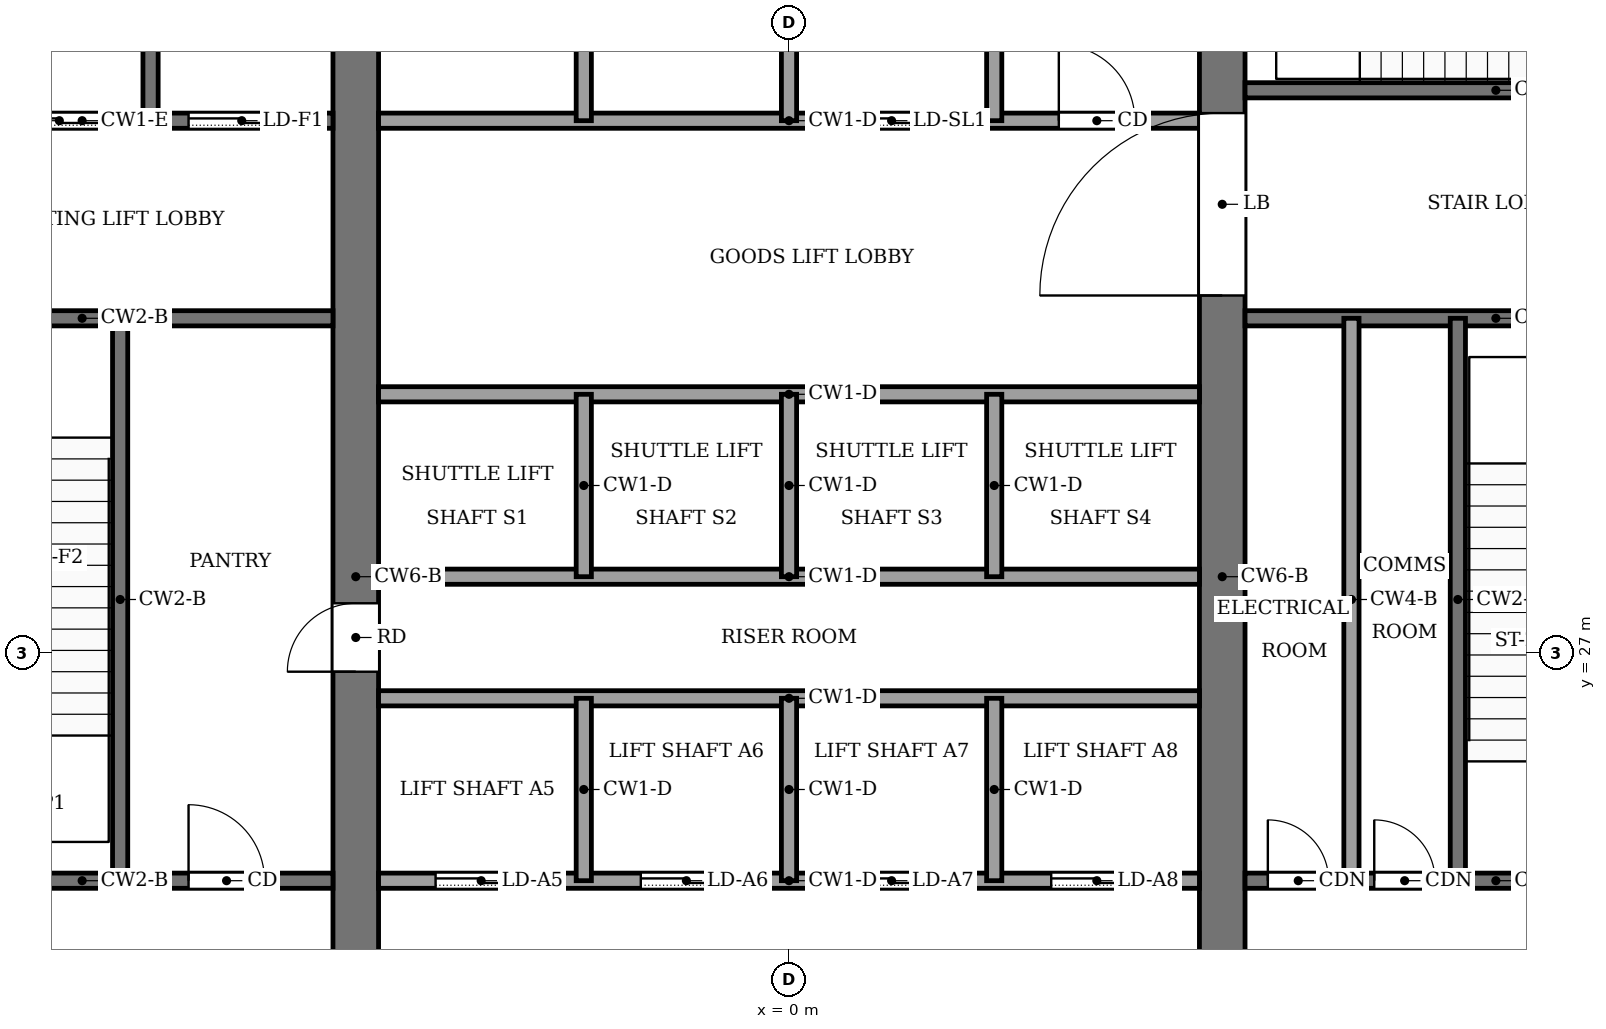
"""IFC4 building model, lengths in metres.
Left out: names, types, materials, properties, quantities, classifications, styles, units other than length and angle.
Written with IfcOpenShell. Run it as: python <this file> out.ifc"""

import sys

from ifc_helpers import new_model, si_unit, direction, frame, frame_2d, origin, place, context, subcontext, project, spatial, rectangle, extrude, element, fill, save


model = new_model("IFC4")
c1 = context("Model", 3, precision=1e-05, world=origin(), true_north=direction((0.0, 1.0)))
c2 = subcontext(c1, "Body", "Model", "MODEL_VIEW")
j1 = project(units=[si_unit("LENGTHUNIT", "METRE"), si_unit("PLANEANGLEUNIT", "RADIAN")], contexts=[c1])
p1 = place(None, origin())
s1 = spatial("IfcSite", under=j1, at=p1, CompositionType="ELEMENT")
p2 = place(p1, origin())
s2 = spatial("IfcBuilding", under=s1, at=p2, CompositionType="ELEMENT")
p3 = place(p2, frame((0.0, 0.0, 65.0)))
s3 = spatial("IfcBuildingStorey", under=s2, at=p3, CompositionType="ELEMENT", Elevation=65.0)
p4 = place(p3, frame((-5.7, 18.4, -0.13), z_axis=(0.0, 0.0, 1.0), x_axis=(0.0, 1.0, 0.0)))
e1 = element("IfcWall", 1, at=p4, inside=s3, PredefinedType="SHEAR", context=c2, shape_type="SweptSolid", body=[
    extrude(rectangle(XDim=19.2, YDim=0.6, at=frame_2d((9.6, 0.0))), origin(), (0.0, 0.0, 1.0), 5.0),
])
p5 = place(p4, frame((8.35, 0.0, 0.13)))
e2 = element("IfcOpeningElement", 2, at=p5, cuts=e1, PredefinedType="OPENING", context=c2, shape_type="SweptSolid", body=[
    extrude(rectangle(XDim=0.9, YDim=2.1, at=frame_2d((0.45, 1.05))), frame((0.0, 0.31, 0.0), z_axis=(0.0, -1.0, 0.0), x_axis=(1.0, 0.0, 0.0)), (0.0, 0.0, 1.0), 0.62),
])
p6 = place(p3, frame((5.7, 18.4, -0.13), z_axis=(0.0, 0.0, 1.0), x_axis=(0.0, 1.0, 0.0)))
e3 = element("IfcWall", 3, at=p6, inside=s3, PredefinedType="SHEAR", context=c2, shape_type="SweptSolid", body=[
    extrude(rectangle(XDim=19.2, YDim=0.6, at=frame_2d((9.6, 0.0))), origin(), (0.0, 0.0, 1.0), 5.0),
])
p7 = place(p6, frame((13.3, 0.0, 0.13)))
e4 = element("IfcOpeningElement", 4, at=p7, cuts=e3, PredefinedType="OPENING", context=c2, shape_type="SweptSolid", body=[
    extrude(rectangle(XDim=2.4, YDim=2.4, at=frame_2d((1.2, 1.2))), frame((0.0, 0.31, 0.0), z_axis=(0.0, -1.0, 0.0), x_axis=(1.0, 0.0, 0.0)), (0.0, 0.0, 1.0), 0.62),
])
p8 = place(p3, frame((-12.6, 24.0, 0.0), z_axis=(0.0, 0.0, 1.0), x_axis=(1.0, 0.0, 0.0)))
e5 = element("IfcWall", 5, at=p8, inside=s3, PredefinedType="PARTITIONING", context=c2, shape_type="SweptSolid", body=[
    extrude(rectangle(XDim=6.6, YDim=0.2, at=frame_2d((3.3, 0.0))), origin(), (0.0, 0.0, 1.0), 4.87),
])
p9 = place(p8, frame((4.7, 0.0, 0.0)))
e6 = element("IfcOpeningElement", 6, at=p9, cuts=e5, PredefinedType="OPENING", context=c2, shape_type="SweptSolid", body=[
    extrude(rectangle(XDim=1.0, YDim=2.1, at=frame_2d((0.5, 1.05))), frame((0.0, 0.11, 0.0), z_axis=(0.0, -1.0, 0.0), x_axis=(1.0, 0.0, 0.0)), (0.0, 0.0, 1.0), 0.22),
])
p10 = place(p3, frame((-5.4, 24.0, 0.0), z_axis=(0.0, 0.0, 1.0), x_axis=(1.0, 0.0, 0.0)))
e7 = element("IfcWall", 7, at=p10, inside=s3, PredefinedType="PARTITIONING", context=c2, shape_type="SweptSolid", body=[
    extrude(rectangle(XDim=10.8, YDim=0.2, at=frame_2d((5.4, 0.0))), origin(), (0.0, 0.0, 1.0), 4.87),
])
p11 = place(p10, frame((0.75, 0.0, 0.0)))
e8 = element("IfcOpeningElement", 8, at=p11, cuts=e7, PredefinedType="OPENING", context=c2, shape_type="SweptSolid", body=[
    extrude(rectangle(XDim=1.2, YDim=2.2, at=frame_2d((0.6, 1.1))), frame((0.0, 0.11, 0.0), z_axis=(0.0, -1.0, 0.0), x_axis=(1.0, 0.0, 0.0)), (0.0, 0.0, 1.0), 0.22),
])
p12 = place(p10, frame((3.45, 0.0, 0.0)))
e9 = element("IfcOpeningElement", 9, at=p12, cuts=e7, PredefinedType="OPENING", context=c2, shape_type="SweptSolid", body=[
    extrude(rectangle(XDim=1.2, YDim=2.2, at=frame_2d((0.6, 1.1))), frame((0.0, 0.11, 0.0), z_axis=(0.0, -1.0, 0.0), x_axis=(1.0, 0.0, 0.0)), (0.0, 0.0, 1.0), 0.22),
])
p13 = place(p10, frame((6.15, 0.0, 0.0)))
e10 = element("IfcOpeningElement", 10, at=p13, cuts=e7, PredefinedType="OPENING", context=c2, shape_type="SweptSolid", body=[
    extrude(rectangle(XDim=1.2, YDim=2.2, at=frame_2d((0.6, 1.1))), frame((0.0, 0.11, 0.0), z_axis=(0.0, -1.0, 0.0), x_axis=(1.0, 0.0, 0.0)), (0.0, 0.0, 1.0), 0.22),
])
p14 = place(p10, frame((8.85, 0.0, 0.0)))
e11 = element("IfcOpeningElement", 11, at=p14, cuts=e7, PredefinedType="OPENING", context=c2, shape_type="SweptSolid", body=[
    extrude(rectangle(XDim=1.2, YDim=2.2, at=frame_2d((0.6, 1.1))), frame((0.0, 0.11, 0.0), z_axis=(0.0, -1.0, 0.0), x_axis=(1.0, 0.0, 0.0)), (0.0, 0.0, 1.0), 0.22),
])
p15 = place(p3, frame((6.0, 24.0, 0.0), z_axis=(0.0, 0.0, 1.0), x_axis=(1.0, 0.0, 0.0)))
e12 = element("IfcWall", 12, at=p15, inside=s3, PredefinedType="PARTITIONING", context=c2, shape_type="SweptSolid", body=[
    extrude(rectangle(XDim=6.6, YDim=0.2, at=frame_2d((3.3, 0.0))), origin(), (0.0, 0.0, 1.0), 4.87),
])
p16 = place(p15, frame((0.3, 0.0, 0.0)))
e13 = element("IfcOpeningElement", 13, at=p16, cuts=e12, PredefinedType="OPENING", context=c2, shape_type="SweptSolid", body=[
    extrude(rectangle(XDim=0.8, YDim=2.1, at=frame_2d((0.4, 1.05))), frame((0.0, 0.11, 0.0), z_axis=(0.0, -1.0, 0.0), x_axis=(1.0, 0.0, 0.0)), (0.0, 0.0, 1.0), 0.22),
])
p17 = place(p15, frame((1.7, 0.0, 0.0)))
e14 = element("IfcOpeningElement", 14, at=p17, cuts=e12, PredefinedType="OPENING", context=c2, shape_type="SweptSolid", body=[
    extrude(rectangle(XDim=0.8, YDim=2.1, at=frame_2d((0.4, 1.05))), frame((0.0, 0.11, 0.0), z_axis=(0.0, -1.0, 0.0), x_axis=(1.0, 0.0, 0.0)), (0.0, 0.0, 1.0), 0.22),
])
p18 = place(p15, frame((4.4, 0.0, 0.0)))
e15 = element("IfcOpeningElement", 15, at=p18, cuts=e12, PredefinedType="OPENING", context=c2, shape_type="SweptSolid", body=[
    extrude(rectangle(XDim=1.2, YDim=2.2, at=frame_2d((0.6, 1.1))), frame((0.0, 0.11, 0.0), z_axis=(0.0, -1.0, 0.0), x_axis=(1.0, 0.0, 0.0)), (0.0, 0.0, 1.0), 0.22),
])
for number, where, z_axis, x_axis in (
    (16, (-5.4, 26.4, 0.0), (0.0, 0.0, 1.0), (1.0, 0.0, 0.0)),
    (17, (-5.4, 28.0, 0.0), (0.0, 0.0, 1.0), (1.0, 0.0, 0.0)),
    (18, (-5.4, 30.4, 0.0), (0.0, 0.0, 1.0), (1.0, 0.0, 0.0)),
):
    element("IfcWall", number, at=place(p3, frame(where, z_axis=z_axis, x_axis=x_axis)), inside=s3, PredefinedType="PARTITIONING", context=c2, shape_type="SweptSolid", body=[
        extrude(rectangle(XDim=10.8, YDim=0.2, at=frame_2d((5.4, 0.0))), origin(), (0.0, 0.0, 1.0), 4.87),
    ])
p19 = place(p3, frame((-12.6, 31.4, 0.0), z_axis=(0.0, 0.0, 1.0), x_axis=(1.0, 0.0, 0.0)))
e19 = element("IfcWall", 19, at=p19, inside=s3, PredefinedType="PARTITIONING", context=c2, shape_type="SweptSolid", body=[
    extrude(rectangle(XDim=6.6, YDim=0.2, at=frame_2d((3.3, 0.0))), origin(), (0.0, 0.0, 1.0), 4.87),
])
p20 = place(p19, frame((1.0, 0.0, 0.0)))
e20 = element("IfcOpeningElement", 20, at=p20, cuts=e19, PredefinedType="OPENING", context=c2, shape_type="SweptSolid", body=[
    extrude(rectangle(XDim=1.2, YDim=2.2, at=frame_2d((0.6, 1.1))), frame((0.0, 0.11, 0.0), z_axis=(0.0, -1.0, 0.0), x_axis=(1.0, 0.0, 0.0)), (0.0, 0.0, 1.0), 0.22),
])
p21 = place(p3, frame((6.0, 31.4, 0.0), z_axis=(0.0, 0.0, 1.0), x_axis=(1.0, 0.0, 0.0)))
e21 = element("IfcWall", 21, at=p21, inside=s3, PredefinedType="PARTITIONING", context=c2, shape_type="SweptSolid", body=[
    extrude(rectangle(XDim=6.6, YDim=0.2, at=frame_2d((3.3, 0.0))), origin(), (0.0, 0.0, 1.0), 4.87),
])
p22 = place(p3, frame((-12.6, 34.0, 0.0), z_axis=(0.0, 0.0, 1.0), x_axis=(1.0, 0.0, 0.0)))
e22 = element("IfcWall", 22, at=p22, inside=s3, PredefinedType="PARTITIONING", context=c2, shape_type="SweptSolid", body=[
    extrude(rectangle(XDim=6.6, YDim=0.2, at=frame_2d((3.3, 0.0))), origin(), (0.0, 0.0, 1.0), 4.87),
])
p23 = place(p22, frame((4.7, 0.0, 0.0)))
e23 = element("IfcOpeningElement", 23, at=p23, cuts=e22, PredefinedType="OPENING", context=c2, shape_type="SweptSolid", body=[
    extrude(rectangle(XDim=1.4, YDim=2.2, at=frame_2d((0.7, 1.1))), frame((0.0, 0.11, 0.0), z_axis=(0.0, -1.0, 0.0), x_axis=(1.0, 0.0, 0.0)), (0.0, 0.0, 1.0), 0.22),
])
p24 = place(p22, frame((2.3, 0.0, 0.0)))
e24 = element("IfcOpeningElement", 24, at=p24, cuts=e22, PredefinedType="OPENING", context=c2, shape_type="SweptSolid", body=[
    extrude(rectangle(XDim=1.4, YDim=2.2, at=frame_2d((0.7, 1.1))), frame((0.0, 0.11, 0.0), z_axis=(0.0, -1.0, 0.0), x_axis=(1.0, 0.0, 0.0)), (0.0, 0.0, 1.0), 0.22),
])
p25 = place(p22, frame((0.45, 0.0, 0.0)))
e25 = element("IfcOpeningElement", 25, at=p25, cuts=e22, PredefinedType="OPENING", context=c2, shape_type="SweptSolid", body=[
    extrude(rectangle(XDim=0.9, YDim=2.1, at=frame_2d((0.45, 1.05))), frame((0.0, 0.11, 0.0), z_axis=(0.0, -1.0, 0.0), x_axis=(1.0, 0.0, 0.0)), (0.0, 0.0, 1.0), 0.22),
])
p26 = place(p3, frame((-5.4, 34.0, 0.0), z_axis=(0.0, 0.0, 1.0), x_axis=(1.0, 0.0, 0.0)))
e26 = element("IfcWall", 26, at=p26, inside=s3, PredefinedType="PARTITIONING", context=c2, shape_type="SweptSolid", body=[
    extrude(rectangle(XDim=10.8, YDim=0.2, at=frame_2d((5.4, 0.0))), origin(), (0.0, 0.0, 1.0), 4.87),
])
p27 = place(p26, frame((6.15, 0.0, 0.0)))
e27 = element("IfcOpeningElement", 27, at=p27, cuts=e26, PredefinedType="OPENING", context=c2, shape_type="SweptSolid", body=[
    extrude(rectangle(XDim=1.2, YDim=2.2, at=frame_2d((0.6, 1.1))), frame((0.0, 0.11, 0.0), z_axis=(0.0, -1.0, 0.0), x_axis=(1.0, 0.0, 0.0)), (0.0, 0.0, 1.0), 0.22),
])
p28 = place(p26, frame((8.95, 0.0, 0.0)))
e28 = element("IfcOpeningElement", 28, at=p28, cuts=e26, PredefinedType="OPENING", context=c2, shape_type="SweptSolid", body=[
    extrude(rectangle(XDim=1.0, YDim=2.1, at=frame_2d((0.5, 1.05))), frame((0.0, 0.11, 0.0), z_axis=(0.0, -1.0, 0.0), x_axis=(1.0, 0.0, 0.0)), (0.0, 0.0, 1.0), 0.22),
])
p29 = place(p3, frame((6.0, 34.4, 0.0), z_axis=(0.0, 0.0, 1.0), x_axis=(1.0, 0.0, 0.0)))
e29 = element("IfcWall", 29, at=p29, inside=s3, PredefinedType="PARTITIONING", context=c2, shape_type="SweptSolid", body=[
    extrude(rectangle(XDim=6.6, YDim=0.2, at=frame_2d((3.3, 0.0))), origin(), (0.0, 0.0, 1.0), 4.87),
])
p30 = place(p29, frame((4.8, 0.0, 0.0)))
e30 = element("IfcOpeningElement", 30, at=p30, cuts=e29, PredefinedType="OPENING", context=c2, shape_type="SweptSolid", body=[
    extrude(rectangle(XDim=1.2, YDim=2.2, at=frame_2d((0.6, 1.1))), frame((0.0, 0.11, 0.0), z_axis=(0.0, -1.0, 0.0), x_axis=(1.0, 0.0, 0.0)), (0.0, 0.0, 1.0), 0.22),
])
p31 = place(p3, frame((-8.8, 24.0, 0.0), z_axis=(0.0, 0.0, 1.0), x_axis=(0.0, 1.0, 0.0)))
e31 = element("IfcWall", 31, at=p31, inside=s3, PredefinedType="PARTITIONING", context=c2, shape_type="SweptSolid", body=[
    extrude(rectangle(XDim=7.4, YDim=0.2, at=frame_2d((3.7, 0.0))), origin(), (0.0, 0.0, 1.0), 4.87),
])
p32 = place(p3, frame((-8.4, 34.0, 0.0), z_axis=(0.0, 0.0, 1.0), x_axis=(0.0, 1.0, 0.0)))
e32 = element("IfcWall", 32, at=p32, inside=s3, PredefinedType="PARTITIONING", context=c2, shape_type="SweptSolid", body=[
    extrude(rectangle(XDim=3.6, YDim=0.2, at=frame_2d((1.8, 0.0))), origin(), (0.0, 0.0, 1.0), 4.87),
])
for number, where, z_axis, x_axis in (
    (33, (-2.7, 24.0, 0.0), (0.0, 0.0, 1.0), (0.0, 1.0, 0.0)),
    (34, (-2.7, 28.0, 0.0), (0.0, 0.0, 1.0), (0.0, 1.0, 0.0)),
):
    element("IfcWall", number, at=place(p3, frame(where, z_axis=z_axis, x_axis=x_axis)), inside=s3, PredefinedType="PARTITIONING", context=c2, shape_type="SweptSolid", body=[
        extrude(rectangle(XDim=2.4, YDim=0.2, at=frame_2d((1.2, 0.0))), origin(), (0.0, 0.0, 1.0), 4.87),
    ])
p33 = place(p3, frame((-2.7, 34.0, 0.0), z_axis=(0.0, 0.0, 1.0), x_axis=(0.0, 1.0, 0.0)))
e35 = element("IfcWall", 35, at=p33, inside=s3, PredefinedType="PARTITIONING", context=c2, shape_type="SweptSolid", body=[
    extrude(rectangle(XDim=3.6, YDim=0.2, at=frame_2d((1.8, 0.0))), origin(), (0.0, 0.0, 1.0), 4.87),
])
for number, where, z_axis, x_axis in (
    (36, (0.0, 24.0, 0.0), (0.0, 0.0, 1.0), (0.0, 1.0, 0.0)),
    (37, (0.0, 28.0, 0.0), (0.0, 0.0, 1.0), (0.0, 1.0, 0.0)),
):
    element("IfcWall", number, at=place(p3, frame(where, z_axis=z_axis, x_axis=x_axis)), inside=s3, PredefinedType="PARTITIONING", context=c2, shape_type="SweptSolid", body=[
        extrude(rectangle(XDim=2.4, YDim=0.2, at=frame_2d((1.2, 0.0))), origin(), (0.0, 0.0, 1.0), 4.87),
    ])
p34 = place(p3, frame((0.0, 34.0, 0.0), z_axis=(0.0, 0.0, 1.0), x_axis=(0.0, 1.0, 0.0)))
e38 = element("IfcWall", 38, at=p34, inside=s3, PredefinedType="PARTITIONING", context=c2, shape_type="SweptSolid", body=[
    extrude(rectangle(XDim=3.6, YDim=0.2, at=frame_2d((1.8, 0.0))), origin(), (0.0, 0.0, 1.0), 4.87),
])
for number, where, z_axis, x_axis in (
    (39, (2.7, 24.0, 0.0), (0.0, 0.0, 1.0), (0.0, 1.0, 0.0)),
    (40, (2.7, 28.0, 0.0), (0.0, 0.0, 1.0), (0.0, 1.0, 0.0)),
):
    element("IfcWall", number, at=place(p3, frame(where, z_axis=z_axis, x_axis=x_axis)), inside=s3, PredefinedType="PARTITIONING", context=c2, shape_type="SweptSolid", body=[
        extrude(rectangle(XDim=2.4, YDim=0.2, at=frame_2d((1.2, 0.0))), origin(), (0.0, 0.0, 1.0), 4.87),
    ])
p35 = place(p3, frame((2.7, 34.0, 0.0), z_axis=(0.0, 0.0, 1.0), x_axis=(0.0, 1.0, 0.0)))
e41 = element("IfcWall", 41, at=p35, inside=s3, PredefinedType="PARTITIONING", context=c2, shape_type="SweptSolid", body=[
    extrude(rectangle(XDim=3.6, YDim=0.2, at=frame_2d((1.8, 0.0))), origin(), (0.0, 0.0, 1.0), 4.87),
])
for number, where, z_axis, x_axis in (
    (42, (7.4, 24.0, 0.0), (0.0, 0.0, 1.0), (0.0, 1.0, 0.0)),
    (43, (8.8, 24.0, 0.0), (0.0, 0.0, 1.0), (0.0, 1.0, 0.0)),
):
    element("IfcWall", number, at=place(p3, frame(where, z_axis=z_axis, x_axis=x_axis)), inside=s3, PredefinedType="PARTITIONING", context=c2, shape_type="SweptSolid", body=[
        extrude(rectangle(XDim=7.4, YDim=0.2, at=frame_2d((3.7, 0.0))), origin(), (0.0, 0.0, 1.0), 4.87),
    ])
p36 = place(p11, origin())
e44 = element("IfcDoor", 44, at=p36, inside=s3, OperationType="SLIDING_TO_LEFT", PredefinedType="DOOR", context=c2, shape_type="SweptSolid", body=[
    extrude(rectangle(XDim=1.2, YDim=2.2, at=frame_2d((0.6, 1.1))), frame((0.0, 0.025, 0.0), z_axis=(0.0, -1.0, 0.0), x_axis=(1.0, 0.0, 0.0)), (0.0, 0.0, 1.0), 0.05),
])
fill(e8, e44)
p37 = place(p12, origin())
e45 = element("IfcDoor", 45, at=p37, inside=s3, OperationType="SLIDING_TO_LEFT", PredefinedType="DOOR", context=c2, shape_type="SweptSolid", body=[
    extrude(rectangle(XDim=1.2, YDim=2.2, at=frame_2d((0.6, 1.1))), frame((0.0, 0.025, 0.0), z_axis=(0.0, -1.0, 0.0), x_axis=(1.0, 0.0, 0.0)), (0.0, 0.0, 1.0), 0.05),
])
fill(e9, e45)
p38 = place(p13, origin())
e46 = element("IfcDoor", 46, at=p38, inside=s3, OperationType="SLIDING_TO_LEFT", PredefinedType="DOOR", context=c2, shape_type="SweptSolid", body=[
    extrude(rectangle(XDim=1.2, YDim=2.2, at=frame_2d((0.6, 1.1))), frame((0.0, 0.025, 0.0), z_axis=(0.0, -1.0, 0.0), x_axis=(1.0, 0.0, 0.0)), (0.0, 0.0, 1.0), 0.05),
])
fill(e10, e46)
p39 = place(p14, origin())
e47 = element("IfcDoor", 47, at=p39, inside=s3, OperationType="SLIDING_TO_LEFT", PredefinedType="DOOR", context=c2, shape_type="SweptSolid", body=[
    extrude(rectangle(XDim=1.2, YDim=2.2, at=frame_2d((0.6, 1.1))), frame((0.0, 0.025, 0.0), z_axis=(0.0, -1.0, 0.0), x_axis=(1.0, 0.0, 0.0)), (0.0, 0.0, 1.0), 0.05),
])
fill(e11, e47)
p40 = place(p27, origin())
e48 = element("IfcDoor", 48, at=p40, inside=s3, OperationType="SLIDING_TO_LEFT", PredefinedType="DOOR", context=c2, shape_type="SweptSolid", body=[
    extrude(rectangle(XDim=1.2, YDim=2.2, at=frame_2d((0.6, 1.1))), frame((0.0, 0.025, 0.0), z_axis=(0.0, -1.0, 0.0), x_axis=(1.0, 0.0, 0.0)), (0.0, 0.0, 1.0), 0.05),
])
fill(e27, e48)
p41 = place(p23, origin())
e49 = element("IfcDoor", 49, at=p41, inside=s3, OperationType="SLIDING_TO_LEFT", PredefinedType="DOOR", context=c2, shape_type="SweptSolid", body=[
    extrude(rectangle(XDim=1.4, YDim=2.2, at=frame_2d((0.7, 1.1))), frame((0.0, 0.025, 0.0), z_axis=(0.0, -1.0, 0.0), x_axis=(1.0, 0.0, 0.0)), (0.0, 0.0, 1.0), 0.05),
])
fill(e23, e49)
p42 = place(p24, origin())
e50 = element("IfcDoor", 50, at=p42, inside=s3, OperationType="SLIDING_TO_LEFT", PredefinedType="DOOR", context=c2, shape_type="SweptSolid", body=[
    extrude(rectangle(XDim=1.4, YDim=2.2, at=frame_2d((0.7, 1.1))), frame((0.0, 0.025, 0.0), z_axis=(0.0, -1.0, 0.0), x_axis=(1.0, 0.0, 0.0)), (0.0, 0.0, 1.0), 0.05),
])
fill(e24, e50)
p43 = place(p9, origin())
e51 = element("IfcDoor", 51, at=p43, inside=s3, OperationType="SINGLE_SWING_RIGHT", PredefinedType="DOOR", context=c2, shape_type="SweptSolid", body=[
    extrude(rectangle(XDim=1.0, YDim=2.1, at=frame_2d((0.5, 1.05))), frame((0.0, 0.025, 0.0), z_axis=(0.0, -1.0, 0.0), x_axis=(1.0, 0.0, 0.0)), (0.0, 0.0, 1.0), 0.05),
])
fill(e6, e51)
p44 = place(p16, origin())
e52 = element("IfcDoor", 52, at=p44, inside=s3, OperationType="SINGLE_SWING_RIGHT", PredefinedType="DOOR", context=c2, shape_type="SweptSolid", body=[
    extrude(rectangle(XDim=0.8, YDim=2.1, at=frame_2d((0.4, 1.05))), frame((0.0, 0.025, 0.0), z_axis=(0.0, -1.0, 0.0), x_axis=(1.0, 0.0, 0.0)), (0.0, 0.0, 1.0), 0.05),
])
fill(e13, e52)
p45 = place(p17, origin())
e53 = element("IfcDoor", 53, at=p45, inside=s3, OperationType="SINGLE_SWING_LEFT", PredefinedType="DOOR", context=c2, shape_type="SweptSolid", body=[
    extrude(rectangle(XDim=0.8, YDim=2.1, at=frame_2d((0.4, 1.05))), frame((0.0, 0.025, 0.0), z_axis=(0.0, -1.0, 0.0), x_axis=(1.0, 0.0, 0.0)), (0.0, 0.0, 1.0), 0.05),
])
fill(e14, e53)
p46 = place(p28, origin())
e54 = element("IfcDoor", 54, at=p46, inside=s3, OperationType="SINGLE_SWING_LEFT", PredefinedType="DOOR", context=c2, shape_type="SweptSolid", body=[
    extrude(rectangle(XDim=1.0, YDim=2.1, at=frame_2d((0.5, 1.05))), frame((0.0, 0.025, 0.0), z_axis=(0.0, -1.0, 0.0), x_axis=(1.0, 0.0, 0.0)), (0.0, 0.0, 1.0), 0.05),
])
fill(e28, e54)
p47 = place(p5, origin())
e55 = element("IfcDoor", 55, at=p47, inside=s3, OperationType="SINGLE_SWING_LEFT", PredefinedType="DOOR", context=c2, shape_type="SweptSolid", body=[
    extrude(rectangle(XDim=0.9, YDim=2.1, at=frame_2d((0.45, 1.05))), frame((0.0, 0.025, 0.0), z_axis=(0.0, -1.0, 0.0), x_axis=(1.0, 0.0, 0.0)), (0.0, 0.0, 1.0), 0.05),
])
fill(e2, e55)
p48 = place(p7, origin())
e56 = element("IfcDoor", 56, at=p48, inside=s3, OperationType="DOUBLE_DOOR_SINGLE_SWING", PredefinedType="DOOR", context=c2, shape_type="SweptSolid", body=[
    extrude(rectangle(XDim=2.4, YDim=2.4, at=frame_2d((1.2, 1.2))), frame((0.0, 0.025, 0.0), z_axis=(0.0, -1.0, 0.0), x_axis=(1.0, 0.0, 0.0)), (0.0, 0.0, 1.0), 0.05),
])
fill(e4, e56)
save(model, sys.argv[1])
